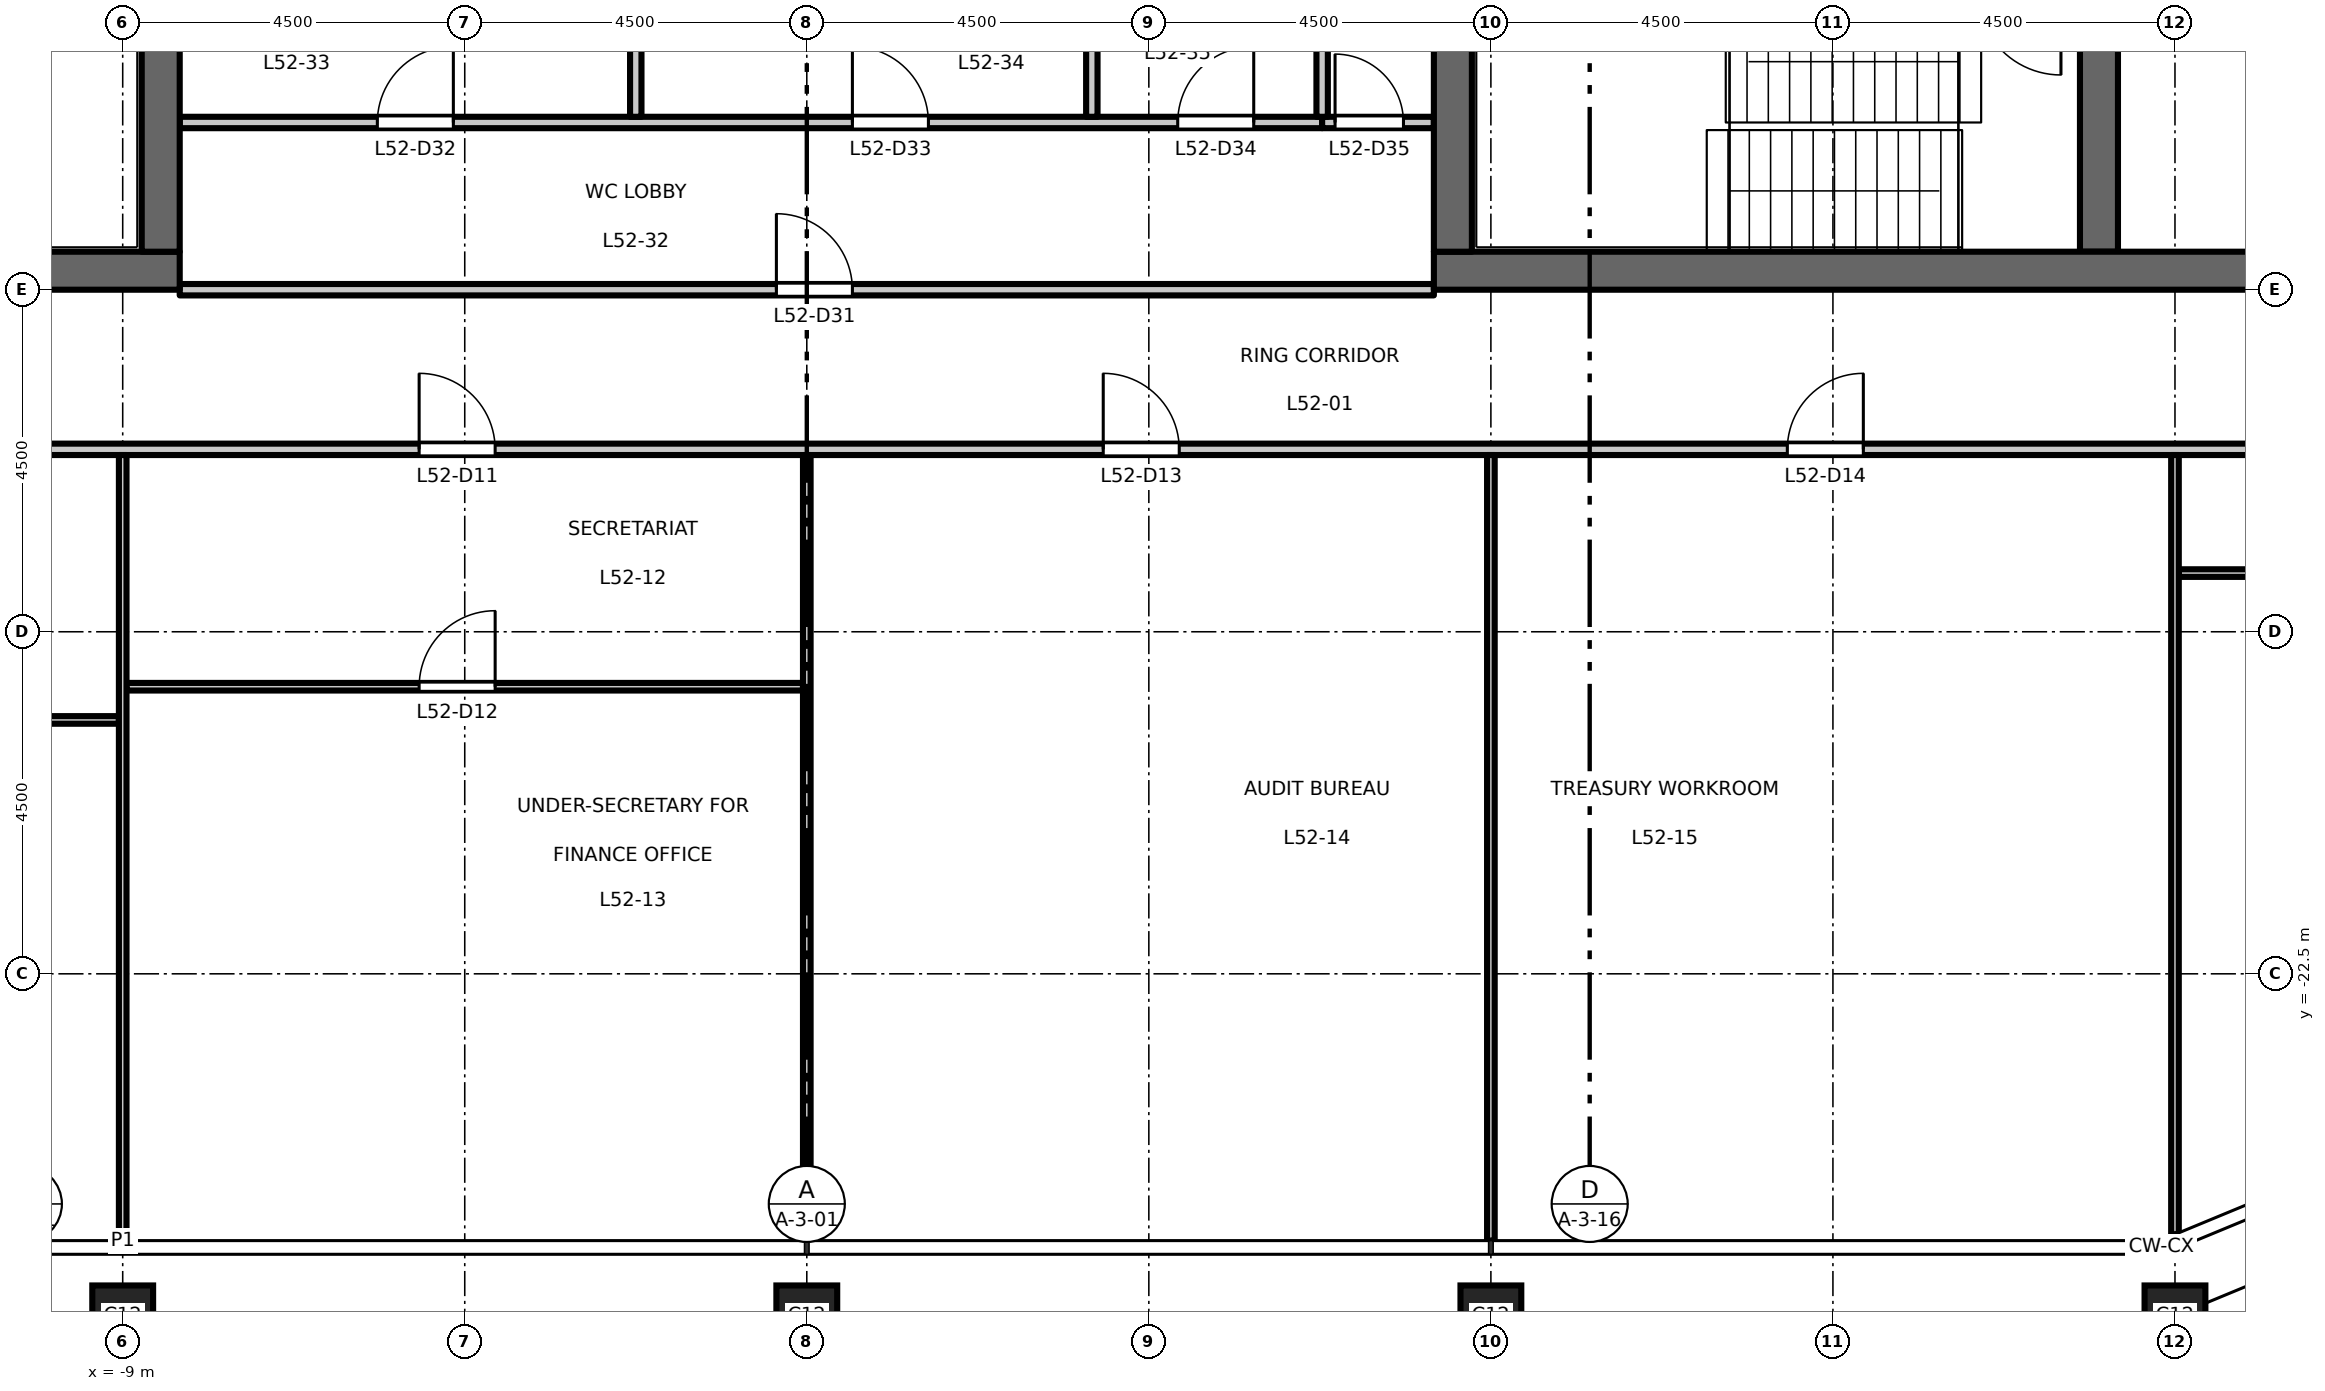
"""IFC4 building model, lengths in metres.
Left out: names, types, materials, properties, quantities, classifications, styles, units other than length and angle.
Written with IfcOpenShell. Run it as: python <this file> out.ifc"""

import sys

from ifc_helpers import new_model, si_unit, direction, frame, frame_2d, origin, origin_2d, place, context, subcontext, project, spatial, rectangle, hollow_rectangle, extrude, element, fill, save


model = new_model("IFC4")
c1 = context("Model", 3, precision=1e-05, world=origin(), true_north=direction((0.0, 1.0)))
c2 = subcontext(c1, "Body", "Model", "MODEL_VIEW")
j1 = project(units=[si_unit("LENGTHUNIT", "METRE"), si_unit("PLANEANGLEUNIT", "RADIAN")], contexts=[c1])
p1 = place(None, origin())
s1 = spatial("IfcSite", under=j1, at=p1, CompositionType="ELEMENT")
p2 = place(p1, origin())
s2 = spatial("IfcBuilding", under=s1, at=p2, CompositionType="ELEMENT")
p3 = place(p2, frame((0.0, 0.0, 242.2)))
s3 = spatial("IfcBuildingStorey", under=s2, at=p3, CompositionType="ELEMENT", Elevation=242.2)
for number, where, z_axis, x_axis in (
    (1, (-9.0, -27.0, 0.0), (0.0, 0.0, 1.0), (1.0, 0.0, 0.0)),
    (2, (0.0, -27.0, 0.0), (0.0, 0.0, 1.0), (1.0, 0.0, 0.0)),
    (3, (9.0, -27.0, 0.0), (0.0, 0.0, 1.0), (1.0, 0.0, 0.0)),
    (4, (18.0, -27.0, 0.0), (0.0, 0.0, 1.0), (1.0, 0.0, 0.0)),
):
    element("IfcColumn", number, at=place(p3, frame(where, z_axis=z_axis, x_axis=x_axis)), inside=s3, PredefinedType="COLUMN", context=c2, shape_type="SweptSolid", body=[
        extrude(hollow_rectangle(XDim=0.8, YDim=0.8, WallThickness=0.045, at=origin_2d()), origin(), (0.0, 0.0, 1.0), 4.5),
    ])
p4 = place(p3, frame((-8.25, -13.25, 0.0), z_axis=(0.0, 0.0, 1.0), x_axis=(-1.0, 0.0, 0.0)))
e5 = element("IfcWall", 5, at=p4, inside=s3, PredefinedType="SHEAR", context=c2, shape_type="SweptSolid", body=[
    extrude(rectangle(XDim=13.5, YDim=0.5, at=frame_2d((6.75, 0.0))), origin(), (0.0, 0.0, 1.0), 4.35),
])
p5 = place(p3, frame((-8.5, -13.0, 0.0), z_axis=(0.0, 0.0, 1.0), x_axis=(0.0, 1.0, 0.0)))
e6 = element("IfcWall", 6, at=p5, inside=s3, PredefinedType="SHEAR", context=c2, shape_type="SweptSolid", body=[
    extrude(rectangle(XDim=26.0, YDim=0.5, at=frame_2d((13.0, 0.0))), origin(), (0.0, 0.0, 1.0), 4.35),
])
p6 = place(p3, frame((17.0, -13.0, 0.0), z_axis=(0.0, 0.0, 1.0), x_axis=(0.0, 1.0, 0.0)))
e7 = element("IfcWall", 7, at=p6, inside=s3, PredefinedType="SHEAR", context=c2, shape_type="SweptSolid", body=[
    extrude(rectangle(XDim=6.575, YDim=0.5, at=frame_2d((3.288, 0.0))), origin(), (0.0, 0.0, 1.0), 4.35),
])
p7 = place(p3, frame((8.25, -13.25, 0.0), z_axis=(0.0, 0.0, 1.0), x_axis=(1.0, 0.0, 0.0)))
e8 = element("IfcWall", 8, at=p7, inside=s3, PredefinedType="SHEAR", context=c2, shape_type="SweptSolid", body=[
    extrude(rectangle(XDim=13.5, YDim=0.5, at=frame_2d((6.75, 0.0))), origin(), (0.0, 0.0, 1.0), 4.35),
])
p8 = place(p3, frame((8.5, -13.0, 0.0), z_axis=(0.0, 0.0, 1.0), x_axis=(0.0, 1.0, 0.0)))
e9 = element("IfcWall", 9, at=p8, inside=s3, PredefinedType="SHEAR", context=c2, shape_type="SweptSolid", body=[
    extrude(rectangle(XDim=26.0, YDim=0.5, at=frame_2d((13.0, 0.0))), origin(), (0.0, 0.0, 1.0), 4.35),
])
p9 = place(p3, frame((-17.95, -19.16, 0.0), z_axis=(0.0, 0.0, 1.0), x_axis=(1.0, 0.0, 0.0)))
e10 = element("IfcWall", 10, at=p9, inside=s3, PredefinedType="PARTITIONING", context=c2, shape_type="SweptSolid", body=[
    extrude(rectangle(XDim=8.9, YDim=0.1, at=frame_2d((4.45, 0.0))), origin(), (0.0, 0.0, 1.0), 4.35),
])
p10 = place(p9, frame((3.85, 0.0, 0.0)))
e11 = element("IfcOpeningElement", 11, at=p10, cuts=e10, PredefinedType="OPENING", context=c2, shape_type="SweptSolid", body=[
    extrude(rectangle(XDim=1.0, YDim=2.1, at=frame_2d((0.5, 1.05))), frame((0.0, 0.06, 0.0), z_axis=(0.0, -1.0, 0.0), x_axis=(1.0, 0.0, 0.0)), (0.0, 0.0, 1.0), 0.12),
])
p11 = place(p3, frame((-8.95, -18.723, 0.0), z_axis=(0.0, 0.0, 1.0), x_axis=(1.0, 0.0, 0.0)))
e12 = element("IfcWall", 12, at=p11, inside=s3, PredefinedType="PARTITIONING", context=c2, shape_type="SweptSolid", body=[
    extrude(rectangle(XDim=8.9, YDim=0.1, at=frame_2d((4.45, 0.0))), origin(), (0.0, 0.0, 1.0), 4.35),
])
p12 = place(p11, frame((3.85, 0.0, 0.0)))
e13 = element("IfcOpeningElement", 13, at=p12, cuts=e12, PredefinedType="OPENING", context=c2, shape_type="SweptSolid", body=[
    extrude(rectangle(XDim=1.0, YDim=2.1, at=frame_2d((0.5, 1.05))), frame((0.0, 0.06, 0.0), z_axis=(0.0, -1.0, 0.0), x_axis=(1.0, 0.0, 0.0)), (0.0, 0.0, 1.0), 0.12),
])
p13 = place(p3, frame((18.05, -17.228, 0.0), z_axis=(0.0, 0.0, 1.0), x_axis=(1.0, 0.0, 0.0)))
e14 = element("IfcWall", 14, at=p13, inside=s3, PredefinedType="PARTITIONING", context=c2, shape_type="SweptSolid", body=[
    extrude(rectangle(XDim=7.96, YDim=0.1, at=frame_2d((3.98, 0.0))), origin(), (0.0, 0.0, 1.0), 4.35),
])
p14 = place(p13, frame((3.6, 0.0, 0.0)))
e15 = element("IfcOpeningElement", 15, at=p14, cuts=e14, PredefinedType="OPENING", context=c2, shape_type="SweptSolid", body=[
    extrude(rectangle(XDim=1.0, YDim=2.1, at=frame_2d((0.5, 1.05))), frame((0.0, 0.06, 0.0), z_axis=(0.0, -1.0, 0.0), x_axis=(1.0, 0.0, 0.0)), (0.0, 0.0, 1.0), 0.12),
])
p15 = place(p3, frame((-23.925, -15.6, 0.0), z_axis=(0.0, 0.0, 1.0), x_axis=(1.0, 0.0, 0.0)))
e16 = element("IfcWall", 16, at=p15, inside=s3, PredefinedType="PARTITIONING", context=c2, shape_type="SweptSolid", body=[
    extrude(rectangle(XDim=47.85, YDim=0.15, at=frame_2d((23.925, 0.0))), origin(), (0.0, 0.0, 1.0), 4.35),
])
p16 = place(p15, frame((9.825, 0.0, 0.0)))
e17 = element("IfcOpeningElement", 17, at=p16, cuts=e16, PredefinedType="OPENING", context=c2, shape_type="SweptSolid", body=[
    extrude(rectangle(XDim=1.0, YDim=2.1, at=frame_2d((0.5, 1.05))), frame((0.0, 0.085, 0.0), z_axis=(0.0, -1.0, 0.0), x_axis=(1.0, 0.0, 0.0)), (0.0, 0.0, 1.0), 0.17),
])
p17 = place(p15, frame((18.825, 0.0, 0.0)))
e18 = element("IfcOpeningElement", 18, at=p17, cuts=e16, PredefinedType="OPENING", context=c2, shape_type="SweptSolid", body=[
    extrude(rectangle(XDim=1.0, YDim=2.1, at=frame_2d((0.5, 1.05))), frame((0.0, 0.085, 0.0), z_axis=(0.0, -1.0, 0.0), x_axis=(1.0, 0.0, 0.0)), (0.0, 0.0, 1.0), 0.17),
])
p18 = place(p15, frame((27.825, 0.0, 0.0)))
e19 = element("IfcOpeningElement", 19, at=p18, cuts=e16, PredefinedType="OPENING", context=c2, shape_type="SweptSolid", body=[
    extrude(rectangle(XDim=1.0, YDim=2.1, at=frame_2d((0.5, 1.05))), frame((0.0, 0.085, 0.0), z_axis=(0.0, -1.0, 0.0), x_axis=(1.0, 0.0, 0.0)), (0.0, 0.0, 1.0), 0.17),
])
p19 = place(p15, frame((36.825, 0.0, 0.0)))
e20 = element("IfcOpeningElement", 20, at=p19, cuts=e16, PredefinedType="OPENING", context=c2, shape_type="SweptSolid", body=[
    extrude(rectangle(XDim=1.0, YDim=2.1, at=frame_2d((0.5, 1.05))), frame((0.0, 0.085, 0.0), z_axis=(0.0, -1.0, 0.0), x_axis=(1.0, 0.0, 0.0)), (0.0, 0.0, 1.0), 0.17),
])
p20 = place(p15, frame((2.475, 0.0, 0.0)))
e21 = element("IfcOpeningElement", 21, at=p20, cuts=e16, PredefinedType="OPENING", context=c2, shape_type="SweptSolid", body=[
    extrude(rectangle(XDim=1.0, YDim=2.1, at=frame_2d((0.5, 1.05))), frame((0.0, 0.085, 0.0), z_axis=(0.0, -1.0, 0.0), x_axis=(1.0, 0.0, 0.0)), (0.0, 0.0, 1.0), 0.17),
])
p21 = place(p15, frame((44.325, 0.0, 0.0)))
e22 = element("IfcOpeningElement", 22, at=p21, cuts=e16, PredefinedType="OPENING", context=c2, shape_type="SweptSolid", body=[
    extrude(rectangle(XDim=1.0, YDim=2.1, at=frame_2d((0.5, 1.05))), frame((0.0, 0.085, 0.0), z_axis=(0.0, -1.0, 0.0), x_axis=(1.0, 0.0, 0.0)), (0.0, 0.0, 1.0), 0.17),
])
p22 = place(p3, frame((-8.25, -13.5, 0.0), z_axis=(0.0, 0.0, 1.0), x_axis=(1.0, 0.0, 0.0)))
e23 = element("IfcWall", 23, at=p22, inside=s3, PredefinedType="PARTITIONING", context=c2, shape_type="SweptSolid", body=[
    extrude(rectangle(XDim=16.5, YDim=0.15, at=frame_2d((8.25, 0.0))), origin(), (0.0, 0.0, 1.0), 3.95),
])
p23 = place(p22, frame((7.85, 0.0, 0.0)))
e24 = element("IfcOpeningElement", 24, at=p23, cuts=e23, PredefinedType="OPENING", context=c2, shape_type="SweptSolid", body=[
    extrude(rectangle(XDim=1.0, YDim=2.1, at=frame_2d((0.5, 1.05))), frame((0.0, 0.085, 0.0), z_axis=(0.0, -1.0, 0.0), x_axis=(1.0, 0.0, 0.0)), (0.0, 0.0, 1.0), 0.17),
])
p24 = place(p3, frame((-8.25, -11.3, 0.0), z_axis=(0.0, 0.0, 1.0), x_axis=(1.0, 0.0, 0.0)))
e25 = element("IfcWall", 25, at=p24, inside=s3, PredefinedType="PARTITIONING", context=c2, shape_type="SweptSolid", body=[
    extrude(rectangle(XDim=15.03, YDim=0.15, at=frame_2d((7.515, 0.0))), origin(), (0.0, 0.0, 1.0), 4.35),
])
p25 = place(p24, frame((2.6, 0.0, 0.0)))
e26 = element("IfcOpeningElement", 26, at=p25, cuts=e25, PredefinedType="OPENING", context=c2, shape_type="SweptSolid", body=[
    extrude(rectangle(XDim=1.0, YDim=2.1, at=frame_2d((0.5, 1.05))), frame((0.0, 0.085, 0.0), z_axis=(0.0, -1.0, 0.0), x_axis=(1.0, 0.0, 0.0)), (0.0, 0.0, 1.0), 0.17),
])
p26 = place(p24, frame((8.85, 0.0, 0.0)))
e27 = element("IfcOpeningElement", 27, at=p26, cuts=e25, PredefinedType="OPENING", context=c2, shape_type="SweptSolid", body=[
    extrude(rectangle(XDim=1.0, YDim=2.1, at=frame_2d((0.5, 1.05))), frame((0.0, 0.085, 0.0), z_axis=(0.0, -1.0, 0.0), x_axis=(1.0, 0.0, 0.0)), (0.0, 0.0, 1.0), 0.17),
])
p27 = place(p24, frame((13.13, 0.0, 0.0)))
e28 = element("IfcOpeningElement", 28, at=p27, cuts=e25, PredefinedType="OPENING", context=c2, shape_type="SweptSolid", body=[
    extrude(rectangle(XDim=1.0, YDim=2.1, at=frame_2d((0.5, 1.05))), frame((0.0, 0.085, 0.0), z_axis=(0.0, -1.0, 0.0), x_axis=(1.0, 0.0, 0.0)), (0.0, 0.0, 1.0), 0.17),
])
p28 = place(p3, frame((6.78, -11.3, 0.0), z_axis=(0.0, 0.0, 1.0), x_axis=(1.0, 0.0, 0.0)))
e29 = element("IfcWall", 29, at=p28, inside=s3, PredefinedType="PARTITIONING", context=c2, shape_type="SweptSolid", body=[
    extrude(rectangle(XDim=1.47, YDim=0.15, at=frame_2d((0.735, 0.0))), origin(), (0.0, 0.0, 1.0), 4.35),
])
p29 = place(p28, frame((0.17, 0.0, 0.0)))
e30 = element("IfcOpeningElement", 30, at=p29, cuts=e29, PredefinedType="OPENING", context=c2, shape_type="SweptSolid", body=[
    extrude(rectangle(XDim=0.9, YDim=2.1, at=frame_2d((0.45, 1.05))), frame((0.0, 0.085, 0.0), z_axis=(0.0, -1.0, 0.0), x_axis=(1.0, 0.0, 0.0)), (0.0, 0.0, 1.0), 0.17),
])
p30 = place(p3, frame((-9.0, -26.01, 0.0), z_axis=(0.0, 0.0, 1.0), x_axis=(0.0, 1.0, 0.0)))
e31 = element("IfcWall", 31, at=p30, inside=s3, PredefinedType="PARTITIONING", context=c2, shape_type="SweptSolid", body=[
    extrude(rectangle(XDim=10.335, YDim=0.1, at=frame_2d((5.167, 0.0))), origin(), (0.0, 0.0, 1.0), 3.65),
])
p31 = place(p3, frame((-2.25, -11.225, 0.0), z_axis=(0.0, 0.0, 1.0), x_axis=(0.0, 1.0, 0.0)))
e32 = element("IfcWall", 32, at=p31, inside=s3, PredefinedType="PARTITIONING", context=c2, shape_type="SweptSolid", body=[
    extrude(rectangle(XDim=2.855, YDim=0.15, at=frame_2d((1.427, 0.0))), origin(), (0.0, 0.0, 1.0), 4.35),
])
p32 = place(p3, frame((0.0, -26.01, 0.0), z_axis=(0.0, 0.0, 1.0), x_axis=(0.0, 1.0, 0.0)))
e33 = element("IfcWall", 33, at=p32, inside=s3, PredefinedType="PARTITIONING", context=c2, shape_type="SweptSolid", body=[
    extrude(rectangle(XDim=10.335, YDim=0.1, at=frame_2d((5.167, 0.0))), origin(), (0.0, 0.0, 1.0), 3.55),
])
p33 = place(p3, frame((3.75, -11.225, 0.0), z_axis=(0.0, 0.0, 1.0), x_axis=(0.0, 1.0, 0.0)))
e34 = element("IfcWall", 34, at=p33, inside=s3, PredefinedType="PARTITIONING", context=c2, shape_type="SweptSolid", body=[
    extrude(rectangle(XDim=2.855, YDim=0.15, at=frame_2d((1.427, 0.0))), origin(), (0.0, 0.0, 1.0), 4.35),
])
p34 = place(p3, frame((6.78, -11.225, 0.0), z_axis=(0.0, 0.0, 1.0), x_axis=(0.0, 1.0, 0.0)))
e35 = element("IfcWall", 35, at=p34, inside=s3, PredefinedType="PARTITIONING", context=c2, shape_type="SweptSolid", body=[
    extrude(rectangle(XDim=3.138, YDim=0.15, at=frame_2d((1.569, 0.0))), origin(), (0.0, 0.0, 1.0), 4.35),
])
p35 = place(p3, frame((9.0, -26.01, 0.0), z_axis=(0.0, 0.0, 1.0), x_axis=(0.0, 1.0, 0.0)))
e36 = element("IfcWall", 36, at=p35, inside=s3, PredefinedType="PARTITIONING", context=c2, shape_type="SweptSolid", body=[
    extrude(rectangle(XDim=10.335, YDim=0.1, at=frame_2d((5.167, 0.0))), origin(), (0.0, 0.0, 1.0), 3.65),
])
p36 = place(p3, frame((18.0, -25.928, 0.0), z_axis=(0.0, 0.0, 1.0), x_axis=(0.0, 1.0, 0.0)))
e37 = element("IfcWall", 37, at=p36, inside=s3, PredefinedType="PARTITIONING", context=c2, shape_type="SweptSolid", body=[
    extrude(rectangle(XDim=10.253, YDim=0.1, at=frame_2d((5.126, 0.0))), origin(), (0.0, 0.0, 1.0), 3.65),
])
p37 = place(p17, origin())
e38 = element("IfcDoor", 38, at=p37, inside=s3, OperationType="SINGLE_SWING_LEFT", PredefinedType="DOOR", context=c2, shape_type="SweptSolid", body=[
    extrude(rectangle(XDim=1.0, YDim=2.1, at=frame_2d((0.5, 1.05))), frame((0.0, 0.025, 0.0), z_axis=(0.0, -1.0, 0.0), x_axis=(1.0, 0.0, 0.0)), (0.0, 0.0, 1.0), 0.05),
])
fill(e18, e38)
p38 = place(p12, origin())
e39 = element("IfcDoor", 39, at=p38, inside=s3, OperationType="SINGLE_SWING_RIGHT", PredefinedType="DOOR", context=c2, shape_type="SweptSolid", body=[
    extrude(rectangle(XDim=1.0, YDim=2.1, at=frame_2d((0.5, 1.05))), frame((0.0, 0.025, 0.0), z_axis=(0.0, -1.0, 0.0), x_axis=(1.0, 0.0, 0.0)), (0.0, 0.0, 1.0), 0.05),
])
fill(e13, e39)
p39 = place(p18, origin())
e40 = element("IfcDoor", 40, at=p39, inside=s3, OperationType="SINGLE_SWING_LEFT", PredefinedType="DOOR", context=c2, shape_type="SweptSolid", body=[
    extrude(rectangle(XDim=1.0, YDim=2.1, at=frame_2d((0.5, 1.05))), frame((0.0, 0.025, 0.0), z_axis=(0.0, -1.0, 0.0), x_axis=(1.0, 0.0, 0.0)), (0.0, 0.0, 1.0), 0.05),
])
fill(e19, e40)
p40 = place(p19, origin())
e41 = element("IfcDoor", 41, at=p40, inside=s3, OperationType="SINGLE_SWING_RIGHT", PredefinedType="DOOR", context=c2, shape_type="SweptSolid", body=[
    extrude(rectangle(XDim=1.0, YDim=2.1, at=frame_2d((0.5, 1.05))), frame((0.0, 0.025, 0.0), z_axis=(0.0, -1.0, 0.0), x_axis=(1.0, 0.0, 0.0)), (0.0, 0.0, 1.0), 0.05),
])
fill(e20, e41)
p41 = place(p23, origin())
e42 = element("IfcDoor", 42, at=p41, inside=s3, OperationType="SINGLE_SWING_LEFT", PredefinedType="DOOR", context=c2, shape_type="SweptSolid", body=[
    extrude(rectangle(XDim=1.0, YDim=2.1, at=frame_2d((0.5, 1.05))), frame((0.0, 0.025, 0.0), z_axis=(0.0, -1.0, 0.0), x_axis=(1.0, 0.0, 0.0)), (0.0, 0.0, 1.0), 0.05),
])
fill(e24, e42)
p42 = place(p25, origin())
e43 = element("IfcDoor", 43, at=p42, inside=s3, OperationType="SINGLE_SWING_RIGHT", PredefinedType="DOOR", context=c2, shape_type="SweptSolid", body=[
    extrude(rectangle(XDim=1.0, YDim=2.1, at=frame_2d((0.5, 1.05))), frame((0.0, 0.025, 0.0), z_axis=(0.0, -1.0, 0.0), x_axis=(1.0, 0.0, 0.0)), (0.0, 0.0, 1.0), 0.05),
])
fill(e26, e43)
p43 = place(p26, origin())
e44 = element("IfcDoor", 44, at=p43, inside=s3, OperationType="SINGLE_SWING_LEFT", PredefinedType="DOOR", context=c2, shape_type="SweptSolid", body=[
    extrude(rectangle(XDim=1.0, YDim=2.1, at=frame_2d((0.5, 1.05))), frame((0.0, 0.025, 0.0), z_axis=(0.0, -1.0, 0.0), x_axis=(1.0, 0.0, 0.0)), (0.0, 0.0, 1.0), 0.05),
])
fill(e27, e44)
p44 = place(p27, origin())
e45 = element("IfcDoor", 45, at=p44, inside=s3, OperationType="SINGLE_SWING_RIGHT", PredefinedType="DOOR", context=c2, shape_type="SweptSolid", body=[
    extrude(rectangle(XDim=1.0, YDim=2.1, at=frame_2d((0.5, 1.05))), frame((0.0, 0.025, 0.0), z_axis=(0.0, -1.0, 0.0), x_axis=(1.0, 0.0, 0.0)), (0.0, 0.0, 1.0), 0.05),
])
fill(e28, e45)
p45 = place(p29, origin())
e46 = element("IfcDoor", 46, at=p45, inside=s3, OperationType="SINGLE_SWING_LEFT", PredefinedType="DOOR", context=c2, shape_type="SweptSolid", body=[
    extrude(rectangle(XDim=0.9, YDim=2.1, at=frame_2d((0.45, 1.05))), frame((0.0, 0.025, 0.0), z_axis=(0.0, -1.0, 0.0), x_axis=(1.0, 0.0, 0.0)), (0.0, 0.0, 1.0), 0.05),
])
fill(e30, e46)
save(model, sys.argv[1])
